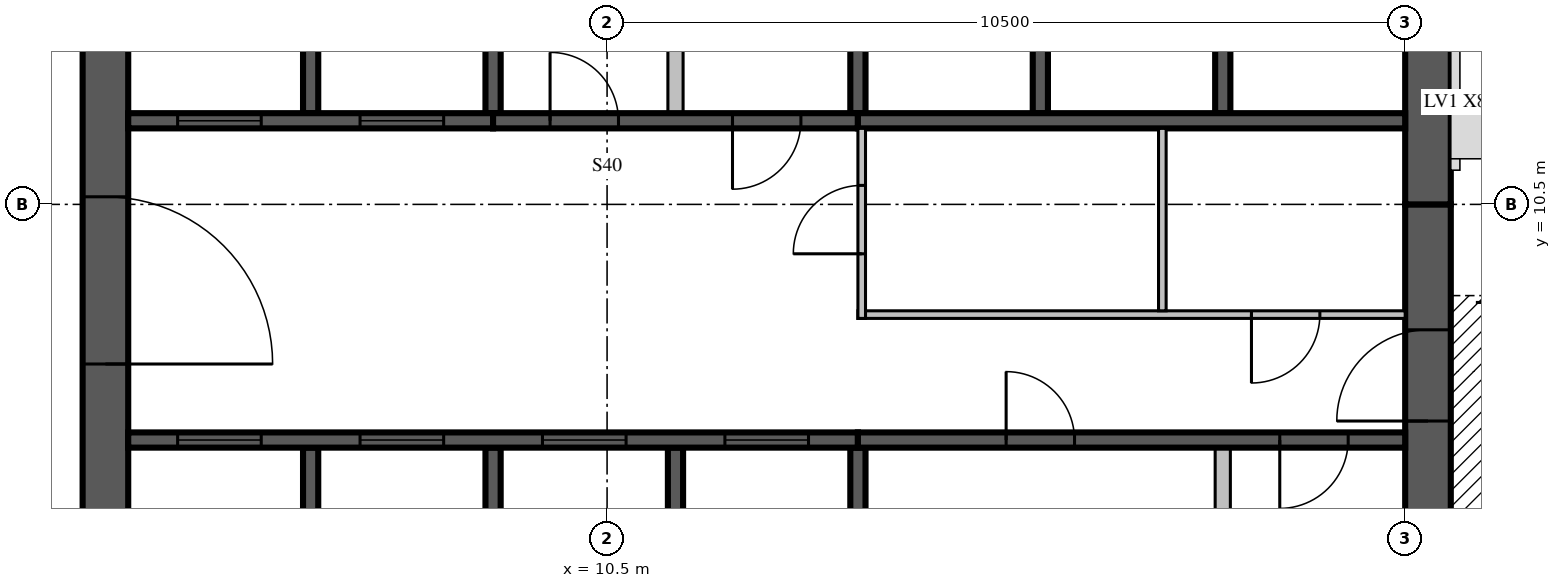
"""IFC4 building model, lengths in metres.
Left out: names, types, materials, properties, quantities, classifications, styles, units other than length and angle.
Written with IfcOpenShell. Run it as: python <this file> out.ifc"""

import sys

from ifc_helpers import new_model, si_unit, direction, frame, frame_2d, origin, place, context, subcontext, project, spatial, rectangle, extrude, source, transform, mapped, element, fill, save


model = new_model("IFC4")
c1 = context("Model", 3, precision=1e-05, world=origin(), true_north=direction((0.0, 1.0)))
c2 = subcontext(c1, "Body", "Model", "MODEL_VIEW")
j1 = project(units=[si_unit("LENGTHUNIT", "METRE"), si_unit("PLANEANGLEUNIT", "RADIAN")], contexts=[c1])
p1 = place(None, origin())
s1 = spatial("IfcSite", under=j1, at=p1, CompositionType="ELEMENT")
p2 = place(p1, origin())
s2 = spatial("IfcBuilding", under=s1, at=p2, CompositionType="ELEMENT")
p3 = place(p2, frame((0.0, 0.0, 295.0)))
s3 = spatial("IfcBuildingStorey", under=s2, at=p3, CompositionType="ELEMENT", Elevation=295.0)
m1 = source(origin(), c2, "Body", "SweptSolid", [
    extrude(rectangle(XDim=17.4, YDim=0.6, at=frame_2d((8.7, 0.0))), origin(), (0.0, 0.0, 1.0), 3.5),
])
p4 = place(p3, frame((3.9, 4.2, 0.0), z_axis=(0.0, 0.0, 1.0), x_axis=(0.0, 1.0, 0.0)))
e1 = element("IfcWall", 1, at=p4, inside=s3, PredefinedType="SHEAR", context=c2, shape_type="MappedRepresentation", body=[
    mapped(m1, transform((0.0, 0.0, 0.0), scale=1.0)),
])
m2 = source(origin(), c2, "Body", "SweptSolid", [
    extrude(rectangle(XDim=2.2, YDim=2.1, at=frame_2d((1.1, 1.05))), frame((0.0, 0.31, 0.0), z_axis=(0.0, -1.0, 0.0), x_axis=(1.0, 0.0, 0.0)), (0.0, 0.0, 1.0), 0.62),
])
p5 = place(p4, frame((4.2, 0.0, 0.0)))
e2 = element("IfcOpeningElement", 2, at=p5, cuts=e1, PredefinedType="OPENING", context=c2, shape_type="MappedRepresentation", body=[
    mapped(m2, transform((0.0, 0.0, 0.0), scale=1.0)),
])
m3 = source(origin(), c2, "Body", "SweptSolid", [
    extrude(rectangle(XDim=0.9, YDim=2.1, at=frame_2d((0.45, 1.05))), frame((0.0, 0.31, 0.0), z_axis=(0.0, -1.0, 0.0), x_axis=(1.0, 0.0, 0.0)), (0.0, 0.0, 1.0), 0.62),
])
p6 = place(p4, frame((10.95, 0.0, 0.0)))
e3 = element("IfcOpeningElement", 3, at=p6, cuts=e1, PredefinedType="OPENING", context=c2, shape_type="MappedRepresentation", body=[
    mapped(m3, transform((0.0, 0.0, 0.0), scale=1.0)),
])
m4 = source(origin(), c2, "Body", "SweptSolid", [
    extrude(rectangle(XDim=6.3, YDim=0.6, at=frame_2d((3.15, 0.0))), origin(), (0.0, 0.0, 1.0), 3.5),
])
p7 = place(p3, frame((21.3, 4.2, 0.0), z_axis=(0.0, 0.0, 1.0), x_axis=(0.0, 1.0, 0.0)))
e4 = element("IfcWall", 4, at=p7, inside=s3, PredefinedType="SHEAR", context=c2, shape_type="MappedRepresentation", body=[
    mapped(m4, transform((0.0, 0.0, 0.0), scale=1.0)),
])
m5 = source(origin(), c2, "Body", "SweptSolid", [
    extrude(rectangle(XDim=1.2, YDim=2.1, at=frame_2d((0.6, 1.05))), frame((0.0, 0.31, 0.0), z_axis=(0.0, -1.0, 0.0), x_axis=(1.0, 0.0, 0.0)), (0.0, 0.0, 1.0), 0.62),
])
p8 = place(p7, frame((3.45, 0.0, 0.0)))
e5 = element("IfcOpeningElement", 5, at=p8, cuts=e4, PredefinedType="OPENING", context=c2, shape_type="MappedRepresentation", body=[
    mapped(m5, transform((0.0, 0.0, 0.0), scale=1.0)),
])
m6 = source(origin(), c2, "Body", "SweptSolid", [
    extrude(rectangle(XDim=10.5, YDim=0.6, at=frame_2d((5.25, 0.0))), origin(), (0.0, 0.0, 1.0), 3.5),
])
p9 = place(p3, frame((21.3, 10.5, 0.0), z_axis=(0.0, 0.0, 1.0), x_axis=(0.0, 1.0, 0.0)))
e6 = element("IfcWall", 6, at=p9, inside=s3, PredefinedType="SHEAR", context=c2, shape_type="MappedRepresentation", body=[
    mapped(m6, transform((0.0, 0.0, 0.0), scale=1.0)),
])
m7 = source(origin(), c2, "Body", "SweptSolid", [
    extrude(rectangle(XDim=1.2, YDim=2.4, at=frame_2d((0.6, 1.2))), frame((0.0, 0.31, 0.0), z_axis=(0.0, -1.0, 0.0), x_axis=(1.0, 0.0, 0.0)), (0.0, 0.0, 1.0), 0.62),
])
p10 = place(p9, frame((5.7, 0.0, 0.6)))
e7 = element("IfcOpeningElement", 7, at=p10, cuts=e6, PredefinedType="OPENING", context=c2, shape_type="MappedRepresentation", body=[
    mapped(m7, transform((0.0, 0.0, 0.0), scale=1.0)),
])
m8 = source(origin(), c2, "Body", "SweptSolid", [
    extrude(rectangle(XDim=3.1, YDim=0.2, at=frame_2d((1.55, 0.0))), origin(), (0.0, 0.0, 1.0), 3.5),
])
for number, where, z_axis, x_axis in (
    (8, (6.6, 4.2, 0.0), (0.0, 0.0, 1.0), (0.0, 1.0, 0.0)),
    (9, (9.0, 4.2, 0.0), (0.0, 0.0, 1.0), (0.0, 1.0, 0.0)),
    (10, (11.4, 4.2, 0.0), (0.0, 0.0, 1.0), (0.0, 1.0, 0.0)),
):
    element("IfcWall", number, at=place(p3, frame(where, z_axis=z_axis, x_axis=x_axis)), inside=s3, PredefinedType="SOLIDWALL", context=c2, shape_type="MappedRepresentation", body=[
        mapped(m8, transform((0.0, 0.0, 0.0), scale=1.0)),
    ])
m9 = source(origin(), c2, "Body", "SweptSolid", [
    extrude(rectangle(XDim=3.1, YDim=0.2, at=frame_2d((1.55, 0.0))), origin(), (0.0, 0.0, 1.0), 3.1),
])
p11 = place(p3, frame((13.8, 4.2, 0.0), z_axis=(0.0, 0.0, 1.0), x_axis=(0.0, 1.0, 0.0)))
e11 = element("IfcWall", 11, at=p11, inside=s3, PredefinedType="SOLIDWALL", context=c2, shape_type="MappedRepresentation", body=[
    mapped(m9, transform((0.0, 0.0, 0.0), scale=1.0)),
])
m10 = source(origin(), c2, "Body", "SweptSolid", [
    extrude(rectangle(XDim=3.1, YDim=0.2, at=frame_2d((1.55, 0.0))), origin(), (0.0, 0.0, 1.0), 3.1),
])
p12 = place(p3, frame((18.6, 4.2, 0.0), z_axis=(0.0, 0.0, 1.0), x_axis=(0.0, 1.0, 0.0)))
e12 = element("IfcWall", 12, at=p12, inside=s3, PredefinedType="PARTITIONING", context=c2, shape_type="MappedRepresentation", body=[
    mapped(m10, transform((0.0, 0.0, 0.0), scale=1.0)),
])
m11 = source(origin(), c2, "Body", "SweptSolid", [
    extrude(rectangle(XDim=3.0, YDim=0.2, at=frame_2d((1.5, 0.0))), origin(), (0.0, 0.0, 1.0), 3.5),
])
p13 = place(p3, frame((6.6, 11.7, 0.0), z_axis=(0.0, 0.0, 1.0), x_axis=(0.0, 1.0, 0.0)))
e13 = element("IfcWall", 13, at=p13, inside=s3, PredefinedType="SOLIDWALL", context=c2, shape_type="MappedRepresentation", body=[
    mapped(m11, transform((0.0, 0.0, 0.0), scale=1.0)),
])
m12 = source(origin(), c2, "Body", "SweptSolid", [
    extrude(rectangle(XDim=3.0, YDim=0.2, at=frame_2d((1.5, 0.0))), origin(), (0.0, 0.0, 1.0), 3.1),
])
for number, where, z_axis, x_axis in (
    (14, (9.0, 11.7, 0.0), (0.0, 0.0, 1.0), (0.0, 1.0, 0.0)),
    (15, (13.8, 11.7, 0.0), (0.0, 0.0, 1.0), (0.0, 1.0, 0.0)),
):
    element("IfcWall", number, at=place(p3, frame(where, z_axis=z_axis, x_axis=x_axis)), inside=s3, PredefinedType="SOLIDWALL", context=c2, shape_type="MappedRepresentation", body=[
        mapped(m12, transform((0.0, 0.0, 0.0), scale=1.0)),
    ])
for number, where, z_axis, x_axis in (
    (16, (16.2, 11.7, 0.0), (0.0, 0.0, 1.0), (0.0, 1.0, 0.0)),
    (17, (18.6, 11.7, 0.0), (0.0, 0.0, 1.0), (0.0, 1.0, 0.0)),
):
    element("IfcWall", number, at=place(p3, frame(where, z_axis=z_axis, x_axis=x_axis)), inside=s3, PredefinedType="SOLIDWALL", context=c2, shape_type="MappedRepresentation", body=[
        mapped(m11, transform((0.0, 0.0, 0.0), scale=1.0)),
    ])
m13 = source(origin(), c2, "Body", "SweptSolid", [
    extrude(rectangle(XDim=3.0, YDim=0.2, at=frame_2d((1.5, 0.0))), origin(), (0.0, 0.0, 1.0), 3.1),
])
p14 = place(p3, frame((11.4, 11.7, 0.0), z_axis=(0.0, 0.0, 1.0), x_axis=(0.0, 1.0, 0.0)))
e18 = element("IfcWall", 18, at=p14, inside=s3, PredefinedType="PARTITIONING", context=c2, shape_type="MappedRepresentation", body=[
    mapped(m13, transform((0.0, 0.0, 0.0), scale=1.0)),
])
m14 = source(origin(), c2, "Body", "SweptSolid", [
    extrude(rectangle(XDim=9.6, YDim=0.2, at=frame_2d((4.8, 0.0))), origin(), (0.0, 0.0, 1.0), 3.5),
])
p15 = place(p3, frame((4.2, 7.4, 0.0), z_axis=(0.0, 0.0, 1.0), x_axis=(1.0, 0.0, 0.0)))
e19 = element("IfcWall", 19, at=p15, inside=s3, PredefinedType="SOLIDWALL", context=c2, shape_type="MappedRepresentation", body=[
    mapped(m14, transform((0.0, 0.0, 0.0), scale=1.0)),
])
m15 = source(origin(), c2, "Body", "SweptSolid", [
    extrude(rectangle(XDim=1.1, YDim=2.1, at=frame_2d((0.55, 1.05))), frame((0.0, 0.11, 0.0), z_axis=(0.0, -1.0, 0.0), x_axis=(1.0, 0.0, 0.0)), (0.0, 0.0, 1.0), 0.22),
])
p16 = place(p15, frame((0.65, 0.0, 0.0)))
e20 = element("IfcOpeningElement", 20, at=p16, cuts=e19, PredefinedType="OPENING", context=c2, shape_type="MappedRepresentation", body=[
    mapped(m15, transform((0.0, 0.0, 0.0), scale=1.0)),
])
p17 = place(p15, frame((3.05, 0.0, 0.0)))
e21 = element("IfcOpeningElement", 21, at=p17, cuts=e19, PredefinedType="OPENING", context=c2, shape_type="MappedRepresentation", body=[
    mapped(m15, transform((0.0, 0.0, 0.0), scale=1.0)),
])
p18 = place(p15, frame((5.45, 0.0, 0.0)))
e22 = element("IfcOpeningElement", 22, at=p18, cuts=e19, PredefinedType="OPENING", context=c2, shape_type="MappedRepresentation", body=[
    mapped(m15, transform((0.0, 0.0, 0.0), scale=1.0)),
])
p19 = place(p15, frame((7.85, 0.0, 0.0)))
e23 = element("IfcOpeningElement", 23, at=p19, cuts=e19, PredefinedType="OPENING", context=c2, shape_type="MappedRepresentation", body=[
    mapped(m15, transform((0.0, 0.0, 0.0), scale=1.0)),
])
m16 = source(origin(), c2, "Body", "SweptSolid", [
    extrude(rectangle(XDim=7.2, YDim=0.2, at=frame_2d((3.6, 0.0))), origin(), (0.0, 0.0, 1.0), 3.1),
])
p20 = place(p3, frame((13.8, 7.4, 0.0), z_axis=(0.0, 0.0, 1.0), x_axis=(1.0, 0.0, 0.0)))
e24 = element("IfcWall", 24, at=p20, inside=s3, PredefinedType="SOLIDWALL", context=c2, shape_type="MappedRepresentation", body=[
    mapped(m16, transform((0.0, 0.0, 0.0), scale=1.0)),
])
m17 = source(origin(), c2, "Body", "SweptSolid", [
    extrude(rectangle(XDim=0.9, YDim=2.1, at=frame_2d((0.45, 1.05))), frame((0.0, 0.11, 0.0), z_axis=(0.0, -1.0, 0.0), x_axis=(1.0, 0.0, 0.0)), (0.0, 0.0, 1.0), 0.22),
])
p21 = place(p20, frame((1.95, 0.0, 0.0)))
e25 = element("IfcOpeningElement", 25, at=p21, cuts=e24, PredefinedType="OPENING", context=c2, shape_type="MappedRepresentation", body=[
    mapped(m17, transform((0.0, 0.0, 0.0), scale=1.0)),
])
p22 = place(p20, frame((5.55, 0.0, 0.0)))
e26 = element("IfcOpeningElement", 26, at=p22, cuts=e24, PredefinedType="OPENING", context=c2, shape_type="MappedRepresentation", body=[
    mapped(m17, transform((0.0, 0.0, 0.0), scale=1.0)),
])
m18 = source(origin(), c2, "Body", "SweptSolid", [
    extrude(rectangle(XDim=4.8, YDim=0.2, at=frame_2d((2.4, 0.0))), origin(), (0.0, 0.0, 1.0), 3.5),
])
p23 = place(p3, frame((4.2, 11.6, 0.0), z_axis=(0.0, 0.0, 1.0), x_axis=(1.0, 0.0, 0.0)))
e27 = element("IfcWall", 27, at=p23, inside=s3, PredefinedType="SOLIDWALL", context=c2, shape_type="MappedRepresentation", body=[
    mapped(m18, transform((0.0, 0.0, 0.0), scale=1.0)),
])
p24 = place(p23, frame((0.65, 0.0, 0.0)))
e28 = element("IfcOpeningElement", 28, at=p24, cuts=e27, PredefinedType="OPENING", context=c2, shape_type="MappedRepresentation", body=[
    mapped(m15, transform((0.0, 0.0, 0.0), scale=1.0)),
])
p25 = place(p23, frame((3.05, 0.0, 0.0)))
e29 = element("IfcOpeningElement", 29, at=p25, cuts=e27, PredefinedType="OPENING", context=c2, shape_type="MappedRepresentation", body=[
    mapped(m15, transform((0.0, 0.0, 0.0), scale=1.0)),
])
m19 = source(origin(), c2, "Body", "SweptSolid", [
    extrude(rectangle(XDim=4.8, YDim=0.2, at=frame_2d((2.4, 0.0))), origin(), (0.0, 0.0, 1.0), 3.1),
])
p26 = place(p3, frame((9.0, 11.6, 0.0), z_axis=(0.0, 0.0, 1.0), x_axis=(1.0, 0.0, 0.0)))
e30 = element("IfcWall", 30, at=p26, inside=s3, PredefinedType="SOLIDWALL", context=c2, shape_type="MappedRepresentation", body=[
    mapped(m19, transform((0.0, 0.0, 0.0), scale=1.0)),
])
p27 = place(p26, frame((0.75, 0.0, 0.0)))
e31 = element("IfcOpeningElement", 31, at=p27, cuts=e30, PredefinedType="OPENING", context=c2, shape_type="MappedRepresentation", body=[
    mapped(m17, transform((0.0, 0.0, 0.0), scale=1.0)),
])
p28 = place(p26, frame((3.15, 0.0, 0.0)))
e32 = element("IfcOpeningElement", 32, at=p28, cuts=e30, PredefinedType="OPENING", context=c2, shape_type="MappedRepresentation", body=[
    mapped(m17, transform((0.0, 0.0, 0.0), scale=1.0)),
])
m20 = source(origin(), c2, "Body", "SweptSolid", [
    extrude(rectangle(XDim=7.2, YDim=0.2, at=frame_2d((3.6, 0.0))), origin(), (0.0, 0.0, 1.0), 3.5),
])
p29 = place(p3, frame((13.8, 11.6, 0.0), z_axis=(0.0, 0.0, 1.0), x_axis=(1.0, 0.0, 0.0)))
e33 = element("IfcWall", 33, at=p29, inside=s3, PredefinedType="SOLIDWALL", context=c2, shape_type="MappedRepresentation", body=[
    mapped(m20, transform((0.0, 0.0, 0.0), scale=1.0)),
])
p30 = place(p3, frame((13.8, 9.05, 0.0), z_axis=(0.0, 0.0, 1.0), x_axis=(1.0, 0.0, 0.0)))
e34 = element("IfcWall", 34, at=p30, inside=s3, PredefinedType="PARTITIONING", context=c2, shape_type="SweptSolid", body=[
    extrude(rectangle(XDim=7.2, YDim=0.1, at=frame_2d((3.6, 0.0))), origin(), (0.0, 0.0, 1.0), 3.1),
])
m21 = source(origin(), c2, "Body", "SweptSolid", [
    extrude(rectangle(XDim=0.9, YDim=2.1, at=frame_2d((0.45, 1.05))), frame((0.0, 0.06, 0.0), z_axis=(0.0, -1.0, 0.0), x_axis=(1.0, 0.0, 0.0)), (0.0, 0.0, 1.0), 0.12),
])
p31 = place(p30, frame((5.178, 0.0, 0.0)))
e35 = element("IfcOpeningElement", 35, at=p31, cuts=e34, PredefinedType="OPENING", context=c2, shape_type="MappedRepresentation", body=[
    mapped(m21, transform((0.0, 0.0, 0.0), scale=1.0)),
])
m22 = source(origin(), c2, "Body", "SweptSolid", [
    extrude(rectangle(XDim=2.5, YDim=0.1, at=frame_2d((1.25, 0.0))), origin(), (0.0, 0.0, 1.0), 3.1),
])
p32 = place(p3, frame((13.85, 9.0, 0.0), z_axis=(0.0, 0.0, 1.0), x_axis=(0.0, 1.0, 0.0)))
e36 = element("IfcWall", 36, at=p32, inside=s3, PredefinedType="PARTITIONING", context=c2, shape_type="MappedRepresentation", body=[
    mapped(m22, transform((0.0, 0.0, 0.0), scale=1.0)),
])
p33 = place(p32, frame((0.85, 0.0, 0.0)))
e37 = element("IfcOpeningElement", 37, at=p33, cuts=e36, PredefinedType="OPENING", context=c2, shape_type="MappedRepresentation", body=[
    mapped(m21, transform((0.0, 0.0, 0.0), scale=1.0)),
])
m23 = source(origin(), c2, "Body", "SweptSolid", [
    extrude(rectangle(XDim=2.4, YDim=0.1, at=frame_2d((1.2, 0.0))), origin(), (0.0, 0.0, 1.0), 3.1),
])
p34 = place(p3, frame((17.805, 9.1, 0.0), z_axis=(0.0, 0.0, 1.0), x_axis=(0.0, 1.0, 0.0)))
e38 = element("IfcWall", 38, at=p34, inside=s3, PredefinedType="PARTITIONING", context=c2, shape_type="MappedRepresentation", body=[
    mapped(m23, transform((0.0, 0.0, 0.0), scale=1.0)),
])
m24 = source(origin(), c2, "Body", "SweptSolid", [
    extrude(rectangle(XDim=1.1, YDim=2.1, at=frame_2d((0.55, 1.05))), frame((0.0, 0.025, 0.0), z_axis=(0.0, -1.0, 0.0), x_axis=(1.0, 0.0, 0.0)), (0.0, 0.0, 1.0), 0.05),
])
p35 = place(p16, origin())
e39 = element("IfcDoor", 39, at=p35, inside=s3, OperationType="SLIDING_TO_LEFT", PredefinedType="DOOR", context=c2, shape_type="MappedRepresentation", body=[
    mapped(m24, transform((0.0, 0.0, 0.0), scale=1.0)),
])
fill(e20, e39)
p36 = place(p17, origin())
e40 = element("IfcDoor", 40, at=p36, inside=s3, OperationType="SLIDING_TO_LEFT", PredefinedType="DOOR", context=c2, shape_type="MappedRepresentation", body=[
    mapped(m24, transform((0.0, 0.0, 0.0), scale=1.0)),
])
fill(e21, e40)
p37 = place(p18, origin())
e41 = element("IfcDoor", 41, at=p37, inside=s3, OperationType="SLIDING_TO_LEFT", PredefinedType="DOOR", context=c2, shape_type="MappedRepresentation", body=[
    mapped(m24, transform((0.0, 0.0, 0.0), scale=1.0)),
])
fill(e22, e41)
p38 = place(p19, origin())
e42 = element("IfcDoor", 42, at=p38, inside=s3, OperationType="SLIDING_TO_LEFT", PredefinedType="DOOR", context=c2, shape_type="MappedRepresentation", body=[
    mapped(m24, transform((0.0, 0.0, 0.0), scale=1.0)),
])
fill(e23, e42)
m25 = source(origin(), c2, "Body", "SweptSolid", [
    extrude(rectangle(XDim=0.9, YDim=2.1, at=frame_2d((0.45, 1.05))), frame((0.0, 0.025, 0.0), z_axis=(0.0, -1.0, 0.0), x_axis=(1.0, 0.0, 0.0)), (0.0, 0.0, 1.0), 0.05),
])
p39 = place(p21, origin())
e43 = element("IfcDoor", 43, at=p39, inside=s3, OperationType="SINGLE_SWING_LEFT", PredefinedType="DOOR", context=c2, shape_type="MappedRepresentation", body=[
    mapped(m25, transform((0.0, 0.0, 0.0), scale=1.0)),
])
fill(e25, e43)
p40 = place(p22, origin())
e44 = element("IfcDoor", 44, at=p40, inside=s3, OperationType="SINGLE_SWING_RIGHT", PredefinedType="DOOR", context=c2, shape_type="MappedRepresentation", body=[
    mapped(m25, transform((0.0, 0.0, 0.0), scale=1.0)),
])
fill(e26, e44)
p41 = place(p24, origin())
e45 = element("IfcDoor", 45, at=p41, inside=s3, OperationType="SLIDING_TO_LEFT", PredefinedType="DOOR", context=c2, shape_type="MappedRepresentation", body=[
    mapped(m24, transform((0.0, 0.0, 0.0), scale=1.0)),
])
fill(e28, e45)
p42 = place(p25, origin())
e46 = element("IfcDoor", 46, at=p42, inside=s3, OperationType="SLIDING_TO_LEFT", PredefinedType="DOOR", context=c2, shape_type="MappedRepresentation", body=[
    mapped(m24, transform((0.0, 0.0, 0.0), scale=1.0)),
])
fill(e29, e46)
p43 = place(p27, origin())
e47 = element("IfcDoor", 47, at=p43, inside=s3, OperationType="SINGLE_SWING_LEFT", PredefinedType="DOOR", context=c2, shape_type="MappedRepresentation", body=[
    mapped(m25, transform((0.0, 0.0, 0.0), scale=1.0)),
])
fill(e31, e47)
p44 = place(p28, origin())
e48 = element("IfcDoor", 48, at=p44, inside=s3, OperationType="SINGLE_SWING_RIGHT", PredefinedType="DOOR", context=c2, shape_type="MappedRepresentation", body=[
    mapped(m25, transform((0.0, 0.0, 0.0), scale=1.0)),
])
fill(e32, e48)
p45 = place(p31, origin())
e49 = element("IfcDoor", 49, at=p45, inside=s3, OperationType="SINGLE_SWING_RIGHT", PredefinedType="DOOR", context=c2, shape_type="MappedRepresentation", body=[
    mapped(m25, transform((0.0, 0.0, 0.0), scale=1.0)),
])
fill(e35, e49)
p46 = place(p33, origin())
e50 = element("IfcDoor", 50, at=p46, inside=s3, OperationType="SINGLE_SWING_LEFT", PredefinedType="DOOR", context=c2, shape_type="MappedRepresentation", body=[
    mapped(m25, transform((0.0, 0.0, 0.0), scale=1.0)),
])
fill(e37, e50)
m26 = source(origin(), c2, "Body", "SweptSolid", [
    extrude(rectangle(XDim=2.2, YDim=2.1, at=frame_2d((1.1, 1.05))), frame((0.0, 0.025, 0.0), z_axis=(0.0, -1.0, 0.0), x_axis=(1.0, 0.0, 0.0)), (0.0, 0.0, 1.0), 0.05),
])
p47 = place(p5, origin())
e51 = element("IfcDoor", 51, at=p47, inside=s3, OperationType="DOUBLE_DOOR_SINGLE_SWING", PredefinedType="DOOR", context=c2, shape_type="MappedRepresentation", body=[
    mapped(m26, transform((0.0, 0.0, 0.0), scale=1.0)),
])
fill(e2, e51)
m27 = source(origin(), c2, "Body", "SweptSolid", [
    extrude(rectangle(XDim=1.2, YDim=2.1, at=frame_2d((0.6, 1.05))), frame((0.0, 0.025, 0.0), z_axis=(0.0, -1.0, 0.0), x_axis=(1.0, 0.0, 0.0)), (0.0, 0.0, 1.0), 0.05),
])
p48 = place(p8, origin())
e52 = element("IfcDoor", 52, at=p48, inside=s3, OperationType="SINGLE_SWING_LEFT", PredefinedType="DOOR", context=c2, shape_type="MappedRepresentation", body=[
    mapped(m27, transform((0.0, 0.0, 0.0), scale=1.0)),
])
fill(e5, e52)
save(model, sys.argv[1])
